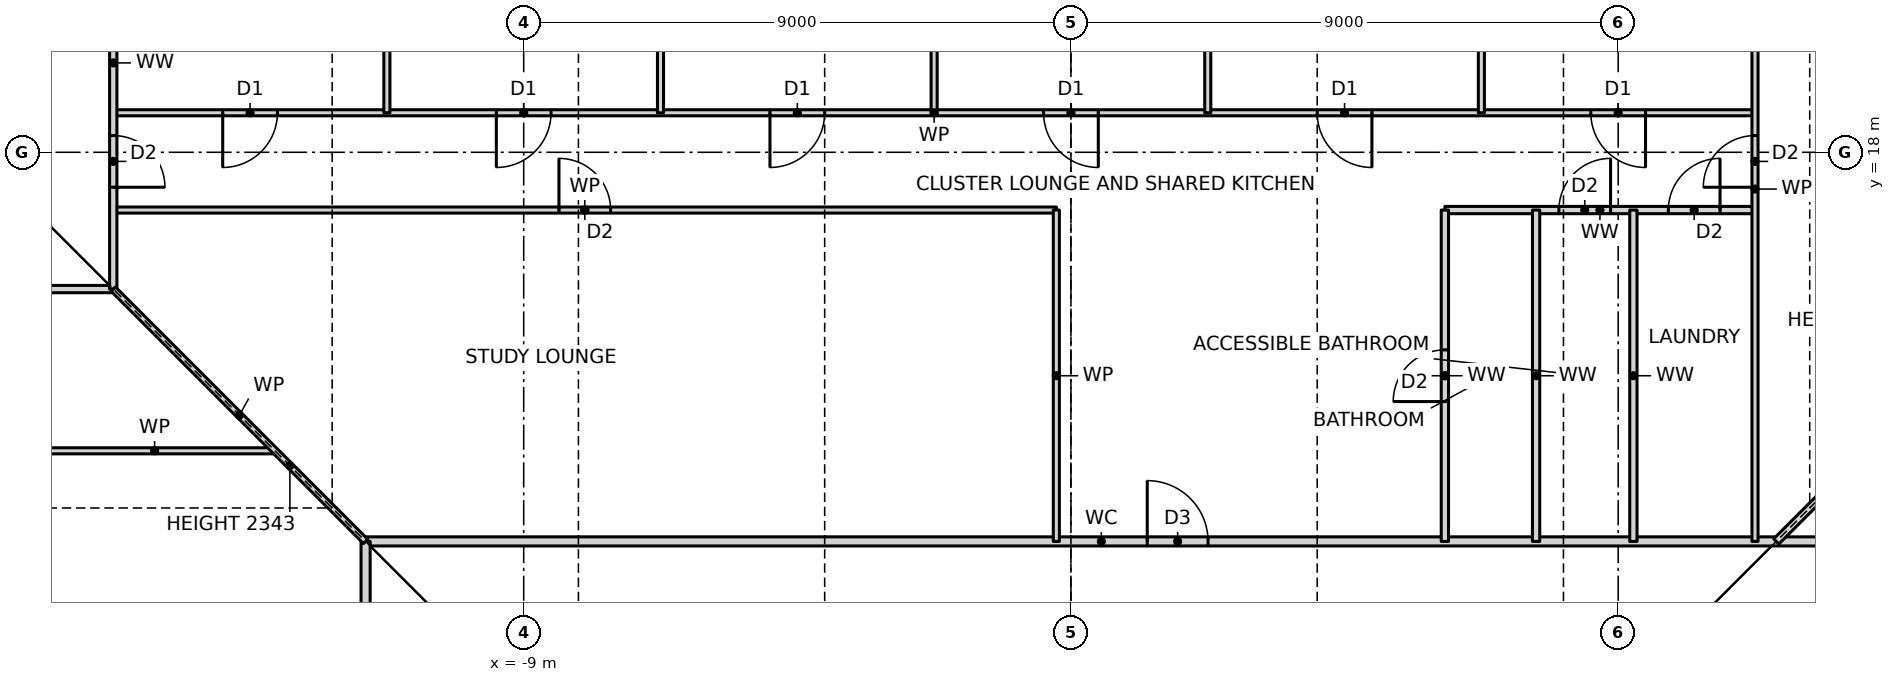
"""IFC4 building model, lengths in metres.
Left out: names, types, materials, properties, quantities, classifications, styles, units other than length and angle.
Written with IfcOpenShell. Run it as: python <this file> out.ifc"""

import sys

from ifc_helpers import new_model, si_unit, direction, frame, frame_2d, origin, place, context, subcontext, project, spatial, rectangle, extrude, element, fill, save


model = new_model("IFC4")
c1 = context("Model", 3, precision=1e-05, world=origin(), true_north=direction((0.0, 1.0)))
c2 = subcontext(c1, "Body", "Model", "MODEL_VIEW")
j1 = project(units=[si_unit("LENGTHUNIT", "METRE"), si_unit("PLANEANGLEUNIT", "RADIAN")], contexts=[c1])
p1 = place(None, origin())
s1 = spatial("IfcSite", under=j1, at=p1, CompositionType="ELEMENT")
p2 = place(p1, origin())
s2 = spatial("IfcBuilding", under=s1, at=p2, CompositionType="ELEMENT")
p3 = place(p2, frame((0.0, 0.0, 32.5)))
s3 = spatial("IfcBuildingStorey", under=s2, at=p3, CompositionType="ELEMENT", Elevation=32.5)
p4 = place(p3, frame((-11.6, 11.6, 0.0), z_axis=(0.0, 0.0, 1.0), x_axis=(1.0, 0.0, 0.0)))
e1 = element("IfcWall", 1, at=p4, inside=s3, PredefinedType="PARTITIONING", context=c2, shape_type="SweptSolid", body=[
    extrude(rectangle(XDim=24.2, YDim=0.15, at=frame_2d((12.1, 0.0))), origin(), (0.0, 0.0, 1.0), 3.27),
])
p5 = place(p4, frame((12.855, 0.0, 0.0)))
e2 = element("IfcOpeningElement", 2, at=p5, cuts=e1, PredefinedType="OPENING", context=c2, shape_type="SweptSolid", body=[
    extrude(rectangle(XDim=1.0, YDim=2.1, at=frame_2d((0.5, 1.05))), frame((0.0, 0.085, 0.0), z_axis=(0.0, -1.0, 0.0), x_axis=(1.0, 0.0, 0.0)), (0.0, 0.0, 1.0), 0.17),
])
p6 = place(p3, frame((-17.05, 13.09, 0.0), z_axis=(0.0, 0.0, 1.0), x_axis=(1.0, 0.0, 0.0)))
e3 = element("IfcWall", 3, at=p6, inside=s3, PredefinedType="PARTITIONING", context=c2, shape_type="SweptSolid", body=[
    extrude(rectangle(XDim=3.96, YDim=0.1, at=frame_2d((1.98, 0.0))), origin(), (0.0, 0.0, 1.0), 3.27),
])
p7 = place(p3, frame((-23.19, 15.75, 0.0), z_axis=(0.0, 0.0, 1.0), x_axis=(1.0, 0.0, 0.0)))
e4 = element("IfcWall", 4, at=p7, inside=s3, PredefinedType="PARTITIONING", context=c2, shape_type="SweptSolid", body=[
    extrude(rectangle(XDim=7.44, YDim=0.12, at=frame_2d((3.72, 0.0))), origin(), (0.0, 0.0, 1.0), 3.27),
])
p8 = place(p3, frame((-15.75, 17.05, 0.0), z_axis=(0.0, 0.0, 1.0), x_axis=(1.0, 0.0, 0.0)))
e5 = element("IfcWall", 5, at=p8, inside=s3, PredefinedType="PARTITIONING", context=c2, shape_type="SweptSolid", body=[
    extrude(rectangle(XDim=15.51, YDim=0.1, at=frame_2d((7.755, 0.0))), origin(), (0.0, 0.0, 1.0), 3.27),
])
p9 = place(p8, frame((7.33, 0.0, 0.0)))
e6 = element("IfcOpeningElement", 6, at=p9, cuts=e5, PredefinedType="OPENING", context=c2, shape_type="SweptSolid", body=[
    extrude(rectangle(XDim=0.85, YDim=2.1, at=frame_2d((0.425, 1.05))), frame((0.0, 0.06, 0.0), z_axis=(0.0, -1.0, 0.0), x_axis=(1.0, 0.0, 0.0)), (0.0, 0.0, 1.0), 0.12),
])
p10 = place(p3, frame((6.15, 17.05, 0.0), z_axis=(0.0, 0.0, 1.0), x_axis=(1.0, 0.0, 0.0)))
e7 = element("IfcWall", 7, at=p10, inside=s3, PredefinedType="PARTITIONING", context=c2, shape_type="SweptSolid", body=[
    extrude(rectangle(XDim=5.1, YDim=0.12, at=frame_2d((2.55, 0.0))), origin(), (0.0, 0.0, 1.0), 3.27),
])
p11 = place(p10, frame((3.675, 0.0, 0.0)))
e8 = element("IfcOpeningElement", 8, at=p11, cuts=e7, PredefinedType="OPENING", context=c2, shape_type="SweptSolid", body=[
    extrude(rectangle(XDim=0.85, YDim=2.1, at=frame_2d((0.425, 1.05))), frame((0.0, 0.07, 0.0), z_axis=(0.0, -1.0, 0.0), x_axis=(1.0, 0.0, 0.0)), (0.0, 0.0, 1.0), 0.14),
])
p12 = place(p10, frame((1.875, 0.0, 0.0)))
e9 = element("IfcOpeningElement", 9, at=p12, cuts=e7, PredefinedType="OPENING", context=c2, shape_type="SweptSolid", body=[
    extrude(rectangle(XDim=0.85, YDim=2.1, at=frame_2d((0.425, 1.05))), frame((0.0, 0.07, 0.0), z_axis=(0.0, -1.0, 0.0), x_axis=(1.0, 0.0, 0.0)), (0.0, 0.0, 1.0), 0.14),
])
p13 = place(p3, frame((-15.75, 18.65, 0.0), z_axis=(0.0, 0.0, 1.0), x_axis=(1.0, 0.0, 0.0)))
e10 = element("IfcWall", 10, at=p13, inside=s3, PredefinedType="PARTITIONING", context=c2, shape_type="SweptSolid", body=[
    extrude(rectangle(XDim=27.0, YDim=0.1, at=frame_2d((13.5, 0.0))), origin(), (0.0, 0.0, 1.0), 3.27),
])
p14 = place(p13, frame((24.3, 0.0, 0.0)))
e11 = element("IfcOpeningElement", 11, at=p14, cuts=e10, PredefinedType="OPENING", context=c2, shape_type="SweptSolid", body=[
    extrude(rectangle(XDim=0.9, YDim=2.1, at=frame_2d((0.45, 1.05))), frame((0.0, 0.06, 0.0), z_axis=(0.0, -1.0, 0.0), x_axis=(1.0, 0.0, 0.0)), (0.0, 0.0, 1.0), 0.12),
])
p15 = place(p13, frame((19.8, 0.0, 0.0)))
e12 = element("IfcOpeningElement", 12, at=p15, cuts=e10, PredefinedType="OPENING", context=c2, shape_type="SweptSolid", body=[
    extrude(rectangle(XDim=0.9, YDim=2.1, at=frame_2d((0.45, 1.05))), frame((0.0, 0.06, 0.0), z_axis=(0.0, -1.0, 0.0), x_axis=(1.0, 0.0, 0.0)), (0.0, 0.0, 1.0), 0.12),
])
p16 = place(p13, frame((15.3, 0.0, 0.0)))
e13 = element("IfcOpeningElement", 13, at=p16, cuts=e10, PredefinedType="OPENING", context=c2, shape_type="SweptSolid", body=[
    extrude(rectangle(XDim=0.9, YDim=2.1, at=frame_2d((0.45, 1.05))), frame((0.0, 0.06, 0.0), z_axis=(0.0, -1.0, 0.0), x_axis=(1.0, 0.0, 0.0)), (0.0, 0.0, 1.0), 0.12),
])
p17 = place(p13, frame((10.8, 0.0, 0.0)))
e14 = element("IfcOpeningElement", 14, at=p17, cuts=e10, PredefinedType="OPENING", context=c2, shape_type="SweptSolid", body=[
    extrude(rectangle(XDim=0.9, YDim=2.1, at=frame_2d((0.45, 1.05))), frame((0.0, 0.06, 0.0), z_axis=(0.0, -1.0, 0.0), x_axis=(1.0, 0.0, 0.0)), (0.0, 0.0, 1.0), 0.12),
])
p18 = place(p13, frame((6.3, 0.0, 0.0)))
e15 = element("IfcOpeningElement", 15, at=p18, cuts=e10, PredefinedType="OPENING", context=c2, shape_type="SweptSolid", body=[
    extrude(rectangle(XDim=0.9, YDim=2.1, at=frame_2d((0.45, 1.05))), frame((0.0, 0.06, 0.0), z_axis=(0.0, -1.0, 0.0), x_axis=(1.0, 0.0, 0.0)), (0.0, 0.0, 1.0), 0.12),
])
p19 = place(p13, frame((1.8, 0.0, 0.0)))
e16 = element("IfcOpeningElement", 16, at=p19, cuts=e10, PredefinedType="OPENING", context=c2, shape_type="SweptSolid", body=[
    extrude(rectangle(XDim=0.9, YDim=2.1, at=frame_2d((0.45, 1.05))), frame((0.0, 0.06, 0.0), z_axis=(0.0, -1.0, 0.0), x_axis=(1.0, 0.0, 0.0)), (0.0, 0.0, 1.0), 0.12),
])
p20 = place(p3, frame((11.6, 11.6, 0.0), z_axis=(0.0, 0.0, 1.0), x_axis=(0.707106781187, 0.707106781187, 0.0)))
e17 = element("IfcWall", 17, at=p20, inside=s3, PredefinedType="PARTITIONING", context=c2, shape_type="SweptSolid", body=[
    extrude(rectangle(XDim=5.869, YDim=0.12, at=frame_2d((2.935, 0.0))), origin(), (0.0, 0.0, 1.0), 2.343),
])
p21 = place(p3, frame((11.25, 11.6, 0.0), z_axis=(0.0, 0.0, 1.0), x_axis=(0.0, 1.0, 0.0)))
e18 = element("IfcWall", 18, at=p21, inside=s3, PredefinedType="PARTITIONING", context=c2, shape_type="SweptSolid", body=[
    extrude(rectangle(XDim=11.59, YDim=0.1, at=frame_2d((5.795, 0.0))), origin(), (0.0, 0.0, 1.0), 3.27),
])
p22 = place(p21, frame((5.825, 0.0, 0.0)))
e19 = element("IfcOpeningElement", 19, at=p22, cuts=e18, PredefinedType="OPENING", context=c2, shape_type="SweptSolid", body=[
    extrude(rectangle(XDim=0.85, YDim=2.1, at=frame_2d((0.425, 1.05))), frame((0.0, 0.06, 0.0), z_axis=(0.0, -1.0, 0.0), x_axis=(1.0, 0.0, 0.0)), (0.0, 0.0, 1.0), 0.12),
])
for number, where, z_axis, x_axis in (
    (20, (9.25, 11.6, 0.0), (0.0, 0.0, 1.0), (0.0, 1.0, 0.0)),
    (21, (7.65, 11.6, 0.0), (0.0, 0.0, 1.0), (0.0, 1.0, 0.0)),
):
    element("IfcWall", number, at=place(p3, frame(where, z_axis=z_axis, x_axis=x_axis)), inside=s3, PredefinedType="PARTITIONING", context=c2, shape_type="SweptSolid", body=[
        extrude(rectangle(XDim=5.45, YDim=0.12, at=frame_2d((2.725, 0.0))), origin(), (0.0, 0.0, 1.0), 3.27),
    ])
p23 = place(p3, frame((6.75, 18.65, 0.0), z_axis=(0.0, 0.0, 1.0), x_axis=(0.0, 1.0, 0.0)))
e22 = element("IfcWall", 22, at=p23, inside=s3, PredefinedType="PARTITIONING", context=c2, shape_type="SweptSolid", body=[
    extrude(rectangle(XDim=4.54, YDim=0.1, at=frame_2d((2.27, 0.0))), origin(), (0.0, 0.0, 1.0), 3.27),
])
p24 = place(p3, frame((6.15, 11.6, 0.0), z_axis=(0.0, 0.0, 1.0), x_axis=(0.0, 1.0, 0.0)))
e23 = element("IfcWall", 23, at=p24, inside=s3, PredefinedType="PARTITIONING", context=c2, shape_type="SweptSolid", body=[
    extrude(rectangle(XDim=5.45, YDim=0.12, at=frame_2d((2.725, 0.0))), origin(), (0.0, 0.0, 1.0), 3.27),
])
p25 = place(p24, frame((2.3, 0.0, 0.0)))
e24 = element("IfcOpeningElement", 24, at=p25, cuts=e23, PredefinedType="OPENING", context=c2, shape_type="SweptSolid", body=[
    extrude(rectangle(XDim=0.85, YDim=2.1, at=frame_2d((0.425, 1.05))), frame((0.0, 0.07, 0.0), z_axis=(0.0, -1.0, 0.0), x_axis=(1.0, 0.0, 0.0)), (0.0, 0.0, 1.0), 0.14),
])
p26 = place(p3, frame((2.25, 18.65, 0.0), z_axis=(0.0, 0.0, 1.0), x_axis=(0.0, 1.0, 0.0)))
e25 = element("IfcWall", 25, at=p26, inside=s3, PredefinedType="PARTITIONING", context=c2, shape_type="SweptSolid", body=[
    extrude(rectangle(XDim=4.54, YDim=0.1, at=frame_2d((2.27, 0.0))), origin(), (0.0, 0.0, 1.0), 3.27),
])
p27 = place(p3, frame((-0.24, 11.6, 0.0), z_axis=(0.0, 0.0, 1.0), x_axis=(0.0, 1.0, 0.0)))
e26 = element("IfcWall", 26, at=p27, inside=s3, PredefinedType="PARTITIONING", context=c2, shape_type="SweptSolid", body=[
    extrude(rectangle(XDim=5.45, YDim=0.1, at=frame_2d((2.725, 0.0))), origin(), (0.0, 0.0, 1.0), 3.27),
])
for number, where, z_axis, x_axis in (
    (27, (-2.25, 18.65, 0.0), (0.0, 0.0, 1.0), (0.0, 1.0, 0.0)),
    (28, (-6.75, 18.65, 0.0), (0.0, 0.0, 1.0), (0.0, 1.0, 0.0)),
    (29, (-11.25, 18.65, 0.0), (0.0, 0.0, 1.0), (0.0, 1.0, 0.0)),
):
    element("IfcWall", number, at=place(p3, frame(where, z_axis=z_axis, x_axis=x_axis)), inside=s3, PredefinedType="PARTITIONING", context=c2, shape_type="SweptSolid", body=[
        extrude(rectangle(XDim=4.54, YDim=0.1, at=frame_2d((2.27, 0.0))), origin(), (0.0, 0.0, 1.0), 3.27),
    ])
p28 = place(p3, frame((-11.6, -11.6, 0.0), z_axis=(0.0, 0.0, 1.0), x_axis=(0.0, 1.0, 0.0)))
e30 = element("IfcWall", 30, at=p28, inside=s3, PredefinedType="PARTITIONING", context=c2, shape_type="SweptSolid", body=[
    extrude(rectangle(XDim=23.2, YDim=0.15, at=frame_2d((11.6, 0.0))), origin(), (0.0, 0.0, 1.0), 3.27),
])
p29 = place(p28, frame((1.65, 0.0, 0.0)))
e31 = element("IfcOpeningElement", 31, at=p29, cuts=e30, PredefinedType="OPENING", context=c2, shape_type="SweptSolid", body=[
    extrude(rectangle(XDim=1.0, YDim=2.1, at=frame_2d((0.5, 1.05))), frame((0.0, 0.085, 0.0), z_axis=(0.0, -1.0, 0.0), x_axis=(1.0, 0.0, 0.0)), (0.0, 0.0, 1.0), 0.17),
])
p30 = place(p3, frame((-15.75, 15.75, 0.0), z_axis=(0.0, 0.0, 1.0), x_axis=(0.0, 1.0, 0.0)))
e32 = element("IfcWall", 32, at=p30, inside=s3, PredefinedType="PARTITIONING", context=c2, shape_type="SweptSolid", body=[
    extrude(rectangle(XDim=7.44, YDim=0.12, at=frame_2d((3.72, 0.0))), origin(), (0.0, 0.0, 1.0), 3.27),
])
p31 = place(p30, frame((1.675, 0.0, 0.0)))
e33 = element("IfcOpeningElement", 33, at=p31, cuts=e32, PredefinedType="OPENING", context=c2, shape_type="SweptSolid", body=[
    extrude(rectangle(XDim=0.85, YDim=2.1, at=frame_2d((0.425, 1.05))), frame((0.0, 0.07, 0.0), z_axis=(0.0, -1.0, 0.0), x_axis=(1.0, 0.0, 0.0)), (0.0, 0.0, 1.0), 0.14),
])
p32 = place(p3, frame((-11.6, 11.6, 0.0), z_axis=(0.0, 0.0, 1.0), x_axis=(-0.707106781187, 0.707106781187, 0.0)))
e34 = element("IfcWall", 34, at=p32, inside=s3, PredefinedType="PARTITIONING", context=c2, shape_type="SweptSolid", body=[
    extrude(rectangle(XDim=5.869, YDim=0.1, at=frame_2d((2.935, 0.0))), origin(), (0.0, 0.0, 1.0), 2.343),
])
p33 = place(p22, origin())
e35 = element("IfcDoor", 35, at=p33, inside=s3, OperationType="SINGLE_SWING_LEFT", PredefinedType="DOOR", context=c2, shape_type="SweptSolid", body=[
    extrude(rectangle(XDim=0.85, YDim=2.1, at=frame_2d((0.425, 1.05))), frame((0.0, 0.025, 0.0), z_axis=(0.0, -1.0, 0.0), x_axis=(1.0, 0.0, 0.0)), (0.0, 0.0, 1.0), 0.05),
])
fill(e19, e35)
p34 = place(p14, frame((0.9, 0.0, 0.0), z_axis=(0.0, 0.0, 1.0), x_axis=(-1.0, 0.0, 0.0)))
e36 = element("IfcDoor", 36, at=p34, inside=s3, OperationType="SINGLE_SWING_LEFT", PredefinedType="DOOR", context=c2, shape_type="SweptSolid", body=[
    extrude(rectangle(XDim=0.9, YDim=2.1, at=frame_2d((0.45, 1.05))), frame((0.0, 0.025, 0.0), z_axis=(0.0, -1.0, 0.0), x_axis=(1.0, 0.0, 0.0)), (0.0, 0.0, 1.0), 0.05),
])
fill(e11, e36)
p35 = place(p15, frame((0.9, 0.0, 0.0), z_axis=(0.0, 0.0, 1.0), x_axis=(-1.0, 0.0, 0.0)))
e37 = element("IfcDoor", 37, at=p35, inside=s3, OperationType="SINGLE_SWING_LEFT", PredefinedType="DOOR", context=c2, shape_type="SweptSolid", body=[
    extrude(rectangle(XDim=0.9, YDim=2.1, at=frame_2d((0.45, 1.05))), frame((0.0, 0.025, 0.0), z_axis=(0.0, -1.0, 0.0), x_axis=(1.0, 0.0, 0.0)), (0.0, 0.0, 1.0), 0.05),
])
fill(e12, e37)
p36 = place(p16, frame((0.9, 0.0, 0.0), z_axis=(0.0, 0.0, 1.0), x_axis=(-1.0, 0.0, 0.0)))
e38 = element("IfcDoor", 38, at=p36, inside=s3, OperationType="SINGLE_SWING_LEFT", PredefinedType="DOOR", context=c2, shape_type="SweptSolid", body=[
    extrude(rectangle(XDim=0.9, YDim=2.1, at=frame_2d((0.45, 1.05))), frame((0.0, 0.025, 0.0), z_axis=(0.0, -1.0, 0.0), x_axis=(1.0, 0.0, 0.0)), (0.0, 0.0, 1.0), 0.05),
])
fill(e13, e38)
p37 = place(p17, frame((0.9, 0.0, 0.0), z_axis=(0.0, 0.0, 1.0), x_axis=(-1.0, 0.0, 0.0)))
e39 = element("IfcDoor", 39, at=p37, inside=s3, OperationType="SINGLE_SWING_RIGHT", PredefinedType="DOOR", context=c2, shape_type="SweptSolid", body=[
    extrude(rectangle(XDim=0.9, YDim=2.1, at=frame_2d((0.45, 1.05))), frame((0.0, 0.025, 0.0), z_axis=(0.0, -1.0, 0.0), x_axis=(1.0, 0.0, 0.0)), (0.0, 0.0, 1.0), 0.05),
])
fill(e14, e39)
p38 = place(p18, frame((0.9, 0.0, 0.0), z_axis=(0.0, 0.0, 1.0), x_axis=(-1.0, 0.0, 0.0)))
e40 = element("IfcDoor", 40, at=p38, inside=s3, OperationType="SINGLE_SWING_RIGHT", PredefinedType="DOOR", context=c2, shape_type="SweptSolid", body=[
    extrude(rectangle(XDim=0.9, YDim=2.1, at=frame_2d((0.45, 1.05))), frame((0.0, 0.025, 0.0), z_axis=(0.0, -1.0, 0.0), x_axis=(1.0, 0.0, 0.0)), (0.0, 0.0, 1.0), 0.05),
])
fill(e15, e40)
p39 = place(p19, frame((0.9, 0.0, 0.0), z_axis=(0.0, 0.0, 1.0), x_axis=(-1.0, 0.0, 0.0)))
e41 = element("IfcDoor", 41, at=p39, inside=s3, OperationType="SINGLE_SWING_RIGHT", PredefinedType="DOOR", context=c2, shape_type="SweptSolid", body=[
    extrude(rectangle(XDim=0.9, YDim=2.1, at=frame_2d((0.45, 1.05))), frame((0.0, 0.025, 0.0), z_axis=(0.0, -1.0, 0.0), x_axis=(1.0, 0.0, 0.0)), (0.0, 0.0, 1.0), 0.05),
])
fill(e16, e41)
p40 = place(p5, origin())
e42 = element("IfcDoor", 42, at=p40, inside=s3, OperationType="SINGLE_SWING_LEFT", PredefinedType="DOOR", context=c2, shape_type="SweptSolid", body=[
    extrude(rectangle(XDim=1.0, YDim=2.1, at=frame_2d((0.5, 1.05))), frame((0.0, 0.025, 0.0), z_axis=(0.0, -1.0, 0.0), x_axis=(1.0, 0.0, 0.0)), (0.0, 0.0, 1.0), 0.05),
])
fill(e2, e42)
p41 = place(p11, origin())
e43 = element("IfcDoor", 43, at=p41, inside=s3, OperationType="SINGLE_SWING_RIGHT", PredefinedType="DOOR", context=c2, shape_type="SweptSolid", body=[
    extrude(rectangle(XDim=0.85, YDim=2.1, at=frame_2d((0.425, 1.05))), frame((0.0, 0.025, 0.0), z_axis=(0.0, -1.0, 0.0), x_axis=(1.0, 0.0, 0.0)), (0.0, 0.0, 1.0), 0.05),
])
fill(e8, e43)
p42 = place(p12, origin())
e44 = element("IfcDoor", 44, at=p42, inside=s3, OperationType="SINGLE_SWING_RIGHT", PredefinedType="DOOR", context=c2, shape_type="SweptSolid", body=[
    extrude(rectangle(XDim=0.85, YDim=2.1, at=frame_2d((0.425, 1.05))), frame((0.0, 0.025, 0.0), z_axis=(0.0, -1.0, 0.0), x_axis=(1.0, 0.0, 0.0)), (0.0, 0.0, 1.0), 0.05),
])
fill(e9, e44)
p43 = place(p25, origin())
e45 = element("IfcDoor", 45, at=p43, inside=s3, OperationType="SINGLE_SWING_LEFT", PredefinedType="DOOR", context=c2, shape_type="SweptSolid", body=[
    extrude(rectangle(XDim=0.85, YDim=2.1, at=frame_2d((0.425, 1.05))), frame((0.0, 0.025, 0.0), z_axis=(0.0, -1.0, 0.0), x_axis=(1.0, 0.0, 0.0)), (0.0, 0.0, 1.0), 0.05),
])
fill(e24, e45)
p44 = place(p9, origin())
e46 = element("IfcDoor", 46, at=p44, inside=s3, OperationType="SINGLE_SWING_LEFT", PredefinedType="DOOR", context=c2, shape_type="SweptSolid", body=[
    extrude(rectangle(XDim=0.85, YDim=2.1, at=frame_2d((0.425, 1.05))), frame((0.0, 0.025, 0.0), z_axis=(0.0, -1.0, 0.0), x_axis=(1.0, 0.0, 0.0)), (0.0, 0.0, 1.0), 0.05),
])
fill(e6, e46)
p45 = place(p31, frame((0.85, 0.0, 0.0), z_axis=(0.0, 0.0, 1.0), x_axis=(-1.0, 0.0, 0.0)))
e47 = element("IfcDoor", 47, at=p45, inside=s3, OperationType="SINGLE_SWING_RIGHT", PredefinedType="DOOR", context=c2, shape_type="SweptSolid", body=[
    extrude(rectangle(XDim=0.85, YDim=2.1, at=frame_2d((0.425, 1.05))), frame((0.0, 0.025, 0.0), z_axis=(0.0, -1.0, 0.0), x_axis=(1.0, 0.0, 0.0)), (0.0, 0.0, 1.0), 0.05),
])
fill(e33, e47)
save(model, sys.argv[1])
